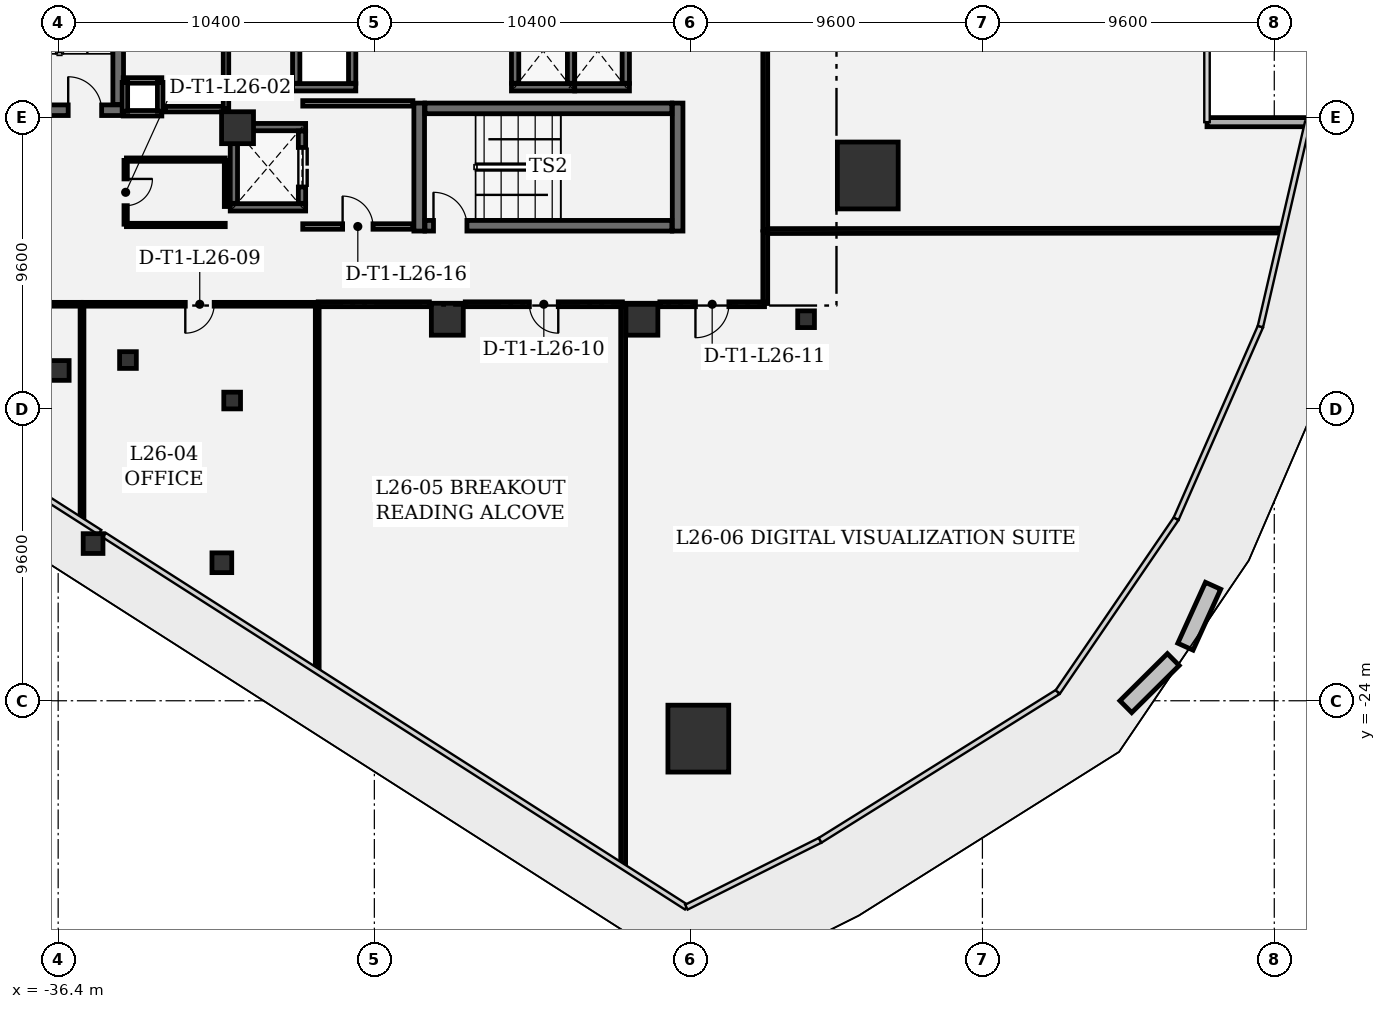
"""IFC4 building model, lengths in metres.
Left out: names, types, materials, properties, quantities, classifications, styles, units other than length and angle.
Written with IfcOpenShell. Run it as: python <this file> out.ifc"""

import sys

from ifc_helpers import new_model, si_unit, direction, frame, frame_2d, origin, origin_2d, place, context, subcontext, project, spatial, rectangle, extrude, element, fill, save


model = new_model("IFC4")
c1 = context("Model", 3, precision=1e-05, world=origin(), true_north=direction((0.0, 1.0)))
c2 = subcontext(c1, "Body", "Model", "MODEL_VIEW")
j1 = project(units=[si_unit("LENGTHUNIT", "METRE"), si_unit("PLANEANGLEUNIT", "RADIAN")], contexts=[c1])
p1 = place(None, origin())
s1 = spatial("IfcSite", under=j1, at=p1, CompositionType="ELEMENT")
p2 = place(p1, origin())
s2 = spatial("IfcBuilding", under=s1, at=p2, CompositionType="ELEMENT")
p3 = place(p2, frame((0.0, 0.0, 117.9)))
s3 = spatial("IfcBuildingStorey", under=s2, at=p3, CompositionType="ELEMENT", Elevation=117.9)
for number, where, z_axis, x_axis in (
    (1, (-15.344, -25.246, 0.0), (0.0, 0.0, 1.0), (1.0, 0.0, 0.0)),
    (2, (-9.77, -6.721, 0.0), (0.0, 0.0, 1.0), (1.0, 0.0, 0.0)),
):
    element("IfcColumn", number, at=place(p3, frame(where, z_axis=z_axis, x_axis=x_axis)), inside=s3, PredefinedType="COLUMN", context=c2, shape_type="SweptSolid", body=[
        extrude(rectangle(XDim=2.0, YDim=2.2, at=origin_2d()), origin(), (0.0, 0.0, 1.0), 4.05),
    ])
for number, where, z_axis, x_axis in (
    (3, (-17.2, -11.45, 0.0), (0.0, 0.0, 1.0), (1.0, 0.0, 0.0)),
    (4, (-23.6, -11.45, 0.0), (0.0, 0.0, 1.0), (1.0, 0.0, 0.0)),
    (5, (-30.5, -5.15, 0.0), (0.0, 0.0, 1.0), (1.0, 0.0, 0.0)),
):
    element("IfcColumn", number, at=place(p3, frame(where, z_axis=z_axis, x_axis=x_axis)), inside=s3, PredefinedType="COLUMN", context=c2, shape_type="SweptSolid", body=[
        extrude(rectangle(XDim=1.05, YDim=1.05, at=origin_2d()), origin(), (0.0, 0.0, 1.0), 4.05),
    ])
for number, where, z_axis, x_axis in (
    (6, (-35.252, -18.829, 0.0), (0.0, 0.0, 1.0), (1.0, 0.0, 0.0)),
    (7, (-31.016, -19.46, 0.0), (0.0, 0.0, 1.0), (1.0, 0.0, 0.0)),
    (8, (-36.365, -13.135, 0.0), (0.0, 0.0, 1.0), (1.0, 0.0, 0.0)),
):
    element("IfcColumn", number, at=place(p3, frame(where, z_axis=z_axis, x_axis=x_axis)), inside=s3, PredefinedType="COLUMN", context=c2, shape_type="SweptSolid", body=[
        extrude(rectangle(XDim=0.65, YDim=0.65, at=origin_2d()), origin(), (0.0, 0.0, 1.0), 4.05),
    ])
for number, where, z_axis, x_axis in (
    (9, (-34.104, -12.792, 0.0), (0.0, 0.0, 1.0), (1.0, 0.0, 0.0)),
    (10, (-30.677, -14.124, 0.0), (0.0, 0.0, 1.0), (1.0, 0.0, 0.0)),
    (11, (-11.8, -11.45, 0.0), (0.0, 0.0, 1.0), (1.0, 0.0, 0.0)),
):
    element("IfcColumn", number, at=place(p3, frame(where, z_axis=z_axis, x_axis=x_axis)), inside=s3, PredefinedType="COLUMN", context=c2, shape_type="SweptSolid", body=[
        extrude(rectangle(XDim=0.55, YDim=0.55, at=origin_2d()), origin(), (0.0, 0.0, 1.0), 4.05),
    ])
p4 = place(p3, frame((4.699, -4.968, 0.0), z_axis=(0.0, 0.0, 1.0), x_axis=(-1.0, 0.0, 0.0)))
e12 = element("IfcWall", 12, at=p4, inside=s3, PredefinedType="SOLIDWALL", context=c2, shape_type="SweptSolid", body=[
    extrude(rectangle(XDim=3.312, YDim=0.3, at=frame_2d((1.656, 0.0))), origin(), (0.0, 0.0, 1.0), 3.77),
])
for number, where, z_axis, x_axis in (
    (13, (-24.525, -4.34, 0.0), (0.0, 0.0, 1.0), (0.0, -1.0, 0.0)),
    (14, (-16.025, -8.55, 0.0), (0.0, 0.0, 1.0), (0.0, 1.0, 0.0)),
):
    element("IfcWall", number, at=place(p3, frame(where, z_axis=z_axis, x_axis=x_axis)), inside=s3, PredefinedType="SHEAR", context=c2, shape_type="SweptSolid", body=[
        extrude(rectangle(XDim=4.21, YDim=0.35, at=frame_2d((2.105, 0.0))), origin(), (0.0, 0.0, 1.0), 3.77),
    ])
p5 = place(p3, frame((-24.335, -8.375, 0.0), z_axis=(0.0, 0.0, 1.0), x_axis=(1.0, 0.0, 0.0)))
e15 = element("IfcWall", 15, at=p5, inside=s3, PredefinedType="SHEAR", context=c2, shape_type="SweptSolid", body=[
    extrude(rectangle(XDim=8.12, YDim=0.35, at=frame_2d((4.06, 0.0))), origin(), (0.0, 0.0, 1.0), 3.77),
])
p6 = place(p5, frame((0.28, 0.0, 0.0)))
e16 = element("IfcOpeningElement", 16, at=p6, cuts=e15, PredefinedType="OPENING", context=c2, shape_type="SweptSolid", body=[
    extrude(rectangle(XDim=1.1, YDim=2.2, at=frame_2d((0.55, 1.1))), frame((0.0, 0.185, 0.0), z_axis=(0.0, -1.0, 0.0), x_axis=(1.0, 0.0, 0.0)), (0.0, 0.0, 1.0), 0.37),
])
p7 = place(p3, frame((-16.215, -4.515, 0.0), z_axis=(0.0, 0.0, 1.0), x_axis=(-1.0, 0.0, 0.0)))
e17 = element("IfcWall", 17, at=p7, inside=s3, PredefinedType="SHEAR", context=c2, shape_type="SweptSolid", body=[
    extrude(rectangle(XDim=8.12, YDim=0.35, at=frame_2d((4.06, 0.0))), origin(), (0.0, 0.0, 1.0), 3.77),
])
p8 = place(p3, frame((-38.46, -4.575, 0.0), z_axis=(0.0, 0.0, 1.0), x_axis=(1.0, 0.0, 0.0)))
e18 = element("IfcWall", 18, at=p8, inside=s3, PredefinedType="SHEAR", context=c2, shape_type="SweptSolid", body=[
    extrude(rectangle(XDim=4.21, YDim=0.35, at=frame_2d((2.105, 0.0))), origin(), (0.0, 0.0, 1.0), 3.77),
])
p9 = place(p8, frame((2.39, 0.0, 0.0)))
e19 = element("IfcOpeningElement", 19, at=p9, cuts=e18, PredefinedType="OPENING", context=c2, shape_type="SweptSolid", body=[
    extrude(rectangle(XDim=1.1, YDim=2.2, at=frame_2d((0.55, 1.1))), frame((0.0, 0.185, 0.0), z_axis=(0.0, -1.0, 0.0), x_axis=(1.0, 0.0, 0.0)), (0.0, 0.0, 1.0), 0.37),
])
p10 = place(p3, frame((-34.425, -4.385, 0.0), z_axis=(0.0, 0.0, 1.0), x_axis=(0.0, 1.0, 0.0)))
e20 = element("IfcWall", 20, at=p10, inside=s3, PredefinedType="SHEAR", context=c2, shape_type="SweptSolid", body=[
    extrude(rectangle(XDim=8.77, YDim=0.35, at=frame_2d((4.385, 0.0))), origin(), (0.0, 0.0, 1.0), 3.77),
])
for number, where, z_axis, x_axis in (
    (21, (-28.26, -7.77, 0.0), (0.0, 0.0, 1.0), (-1.0, 0.0, 0.0)),
    (22, (-30.74, -5.13, 0.0), (0.0, 0.0, 1.0), (1.0, 0.0, 0.0)),
):
    element("IfcWall", number, at=place(p3, frame(where, z_axis=z_axis, x_axis=x_axis)), inside=s3, PredefinedType="SHEAR", context=c2, shape_type="SweptSolid", body=[
        extrude(rectangle(XDim=2.48, YDim=0.24, at=frame_2d((1.24, 0.0))), origin(), (0.0, 0.0, 1.0), 3.77),
    ])
p11 = place(p3, frame((-30.62, -7.638, 0.0), z_axis=(0.0, 0.0, 1.0), x_axis=(0.0, 1.0, 0.0)))
e23 = element("IfcWall", 23, at=p11, inside=s3, PredefinedType="SHEAR", context=c2, shape_type="SweptSolid", body=[
    extrude(rectangle(XDim=2.376, YDim=0.24, at=frame_2d((1.188, 0.0))), origin(), (0.0, 0.0, 1.0), 3.77),
])
p12 = place(p3, frame((-28.38, -5.262, 0.0), z_axis=(0.0, 0.0, 1.0), x_axis=(0.0, -1.0, 0.0)))
e24 = element("IfcWall", 24, at=p12, inside=s3, PredefinedType="SHEAR", context=c2, shape_type="SweptSolid", body=[
    extrude(rectangle(XDim=2.376, YDim=0.24, at=frame_2d((1.188, 0.0))), origin(), (0.0, 0.0, 1.0), 3.77),
])
p13 = place(p12, frame((0.538, 0.0, 0.0)))
e25 = element("IfcOpeningElement", 25, at=p13, cuts=e24, PredefinedType="OPENING", context=c2, shape_type="SweptSolid", body=[
    extrude(rectangle(XDim=1.3, YDim=2.3, at=frame_2d((0.65, 1.15))), frame((0.0, 0.13, 0.0), z_axis=(0.0, -1.0, 0.0), x_axis=(1.0, 0.0, 0.0)), (0.0, 0.0, 1.0), 0.26),
])
p14 = place(p3, frame((-26.61, -3.82, 0.0), z_axis=(0.0, 0.0, 1.0), x_axis=(-1.0, 0.0, 0.0)))
e26 = element("IfcWall", 26, at=p14, inside=s3, PredefinedType="SHEAR", context=c2, shape_type="SweptSolid", body=[
    extrude(rectangle(XDim=2.08, YDim=0.24, at=frame_2d((1.04, 0.0))), origin(), (0.0, 0.0, 1.0), 3.77),
])
for number, where, z_axis, x_axis in (
    (27, (-28.57, -3.688, 0.0), (0.0, 0.0, 1.0), (0.0, 1.0, 0.0)),
    (28, (-26.73, -1.562, 0.0), (0.0, 0.0, 1.0), (0.0, -1.0, 0.0)),
):
    element("IfcWall", number, at=place(p3, frame(where, z_axis=z_axis, x_axis=x_axis)), inside=s3, PredefinedType="SHEAR", context=c2, shape_type="SweptSolid", body=[
        extrude(rectangle(XDim=2.126, YDim=0.24, at=frame_2d((1.063, 0.0))), origin(), (0.0, 0.0, 1.0), 3.77),
    ])
p15 = place(p3, frame((-19.41, -3.82, 0.0), z_axis=(0.0, 0.0, 1.0), x_axis=(-1.0, 0.0, 0.0)))
e29 = element("IfcWall", 29, at=p15, inside=s3, PredefinedType="SHEAR", context=c2, shape_type="SweptSolid", body=[
    extrude(rectangle(XDim=2.08, YDim=0.24, at=frame_2d((1.04, 0.0))), origin(), (0.0, 0.0, 1.0), 3.77),
])
for number, where, z_axis, x_axis in (
    (30, (-21.37, -3.688, 0.0), (0.0, 0.0, 1.0), (0.0, 1.0, 0.0)),
    (31, (-19.53, -1.562, 0.0), (0.0, 0.0, 1.0), (0.0, -1.0, 0.0)),
):
    element("IfcWall", number, at=place(p3, frame(where, z_axis=z_axis, x_axis=x_axis)), inside=s3, PredefinedType="SHEAR", context=c2, shape_type="SweptSolid", body=[
        extrude(rectangle(XDim=2.126, YDim=0.24, at=frame_2d((1.063, 0.0))), origin(), (0.0, 0.0, 1.0), 3.77),
    ])
p16 = place(p3, frame((-17.61, -3.82, 0.0), z_axis=(0.0, 0.0, 1.0), x_axis=(-1.0, 0.0, 0.0)))
e32 = element("IfcWall", 32, at=p16, inside=s3, PredefinedType="SHEAR", context=c2, shape_type="SweptSolid", body=[
    extrude(rectangle(XDim=1.8, YDim=0.24, at=frame_2d((0.9, 0.0))), origin(), (0.0, 0.0, 1.0), 3.77),
])
p17 = place(p3, frame((-17.73, -1.562, 0.0), z_axis=(0.0, 0.0, 1.0), x_axis=(0.0, -1.0, 0.0)))
e33 = element("IfcWall", 33, at=p17, inside=s3, PredefinedType="SHEAR", context=c2, shape_type="SweptSolid", body=[
    extrude(rectangle(XDim=2.126, YDim=0.24, at=frame_2d((1.063, 0.0))), origin(), (0.0, 0.0, 1.0), 3.77),
])
for number, where, z_axis, x_axis in (
    (34, (-32.99, -4.675, 0.0), (0.0, 0.0, 1.0), (-1.0, 0.0, 0.0)),
    (35, (-34.26, -3.595, 0.0), (0.0, 0.0, 1.0), (1.0, 0.0, 0.0)),
):
    element("IfcWall", number, at=place(p3, frame(where, z_axis=z_axis, x_axis=x_axis)), inside=s3, PredefinedType="PARTITIONING", context=c2, shape_type="SweptSolid", body=[
        extrude(rectangle(XDim=1.27, YDim=0.18, at=frame_2d((0.635, 0.0))), origin(), (0.0, 0.0, 1.0), 3.77),
    ])
for number, where, z_axis, x_axis in (
    (36, (-34.205, -4.61, 0.0), (0.0, 0.0, 1.0), (0.0, 1.0, 0.0)),
    (37, (-33.045, -3.66, 0.0), (0.0, 0.0, 1.0), (0.0, -1.0, 0.0)),
):
    element("IfcWall", number, at=place(p3, frame(where, z_axis=z_axis, x_axis=x_axis)), inside=s3, PredefinedType="PARTITIONING", context=c2, shape_type="SweptSolid", body=[
        extrude(rectangle(XDim=0.95, YDim=0.18, at=frame_2d((0.475, 0.0))), origin(), (0.0, 0.0, 1.0), 3.77),
    ])
p18 = place(p3, frame((-28.355, -8.4, 0.0), z_axis=(0.0, 0.0, 1.0), x_axis=(1.0, 0.0, 0.0)))
e38 = element("IfcWall", 38, at=p18, inside=s3, PredefinedType="PARTITIONING", context=c2, shape_type="SweptSolid", body=[
    extrude(rectangle(XDim=3.622, YDim=0.18, at=frame_2d((1.811, 0.0))), origin(), (0.0, 0.0, 1.0), 3.77),
])
p19 = place(p18, frame((1.311, 0.0, 0.0)))
e39 = element("IfcOpeningElement", 39, at=p19, cuts=e38, PredefinedType="OPENING", context=c2, shape_type="SweptSolid", body=[
    extrude(rectangle(XDim=1.0, YDim=2.15, at=frame_2d((0.5, 1.075))), frame((0.0, 0.1, 0.0), z_axis=(0.0, -1.0, 0.0), x_axis=(1.0, 0.0, 0.0)), (0.0, 0.0, 1.0), 0.2),
])
p20 = place(p3, frame((-24.733, -4.35, 0.0), z_axis=(0.0, 0.0, 1.0), x_axis=(-1.0, 0.0, 0.0)))
e40 = element("IfcWall", 40, at=p20, inside=s3, PredefinedType="PARTITIONING", context=c2, shape_type="SweptSolid", body=[
    extrude(rectangle(XDim=3.622, YDim=0.18, at=frame_2d((1.811, 0.0))), origin(), (0.0, 0.0, 1.0), 3.77),
])
p21 = place(p3, frame((-34.18, -6.225, 0.0), z_axis=(0.0, 0.0, 1.0), x_axis=(0.0, -1.0, 0.0)))
e41 = element("IfcWall", 41, at=p21, inside=s3, PredefinedType="PARTITIONING", context=c2, shape_type="SweptSolid", body=[
    extrude(rectangle(XDim=2.1, YDim=0.11, at=frame_2d((1.05, 0.0))), origin(), (0.0, 0.0, 1.0), 3.77),
])
p22 = place(p21, frame((0.61, 0.0, 0.0)))
e42 = element("IfcOpeningElement", 42, at=p22, cuts=e41, PredefinedType="OPENING", context=c2, shape_type="SweptSolid", body=[
    extrude(rectangle(XDim=0.88, YDim=2.1, at=frame_2d((0.44, 1.05))), frame((0.0, 0.065, 0.0), z_axis=(0.0, -1.0, 0.0), x_axis=(1.0, 0.0, 0.0)), (0.0, 0.0, 1.0), 0.13),
])
p23 = place(p3, frame((-34.155, -8.35, 0.0), z_axis=(0.0, 0.0, 1.0), x_axis=(1.0, 0.0, 0.0)))
e43 = element("IfcWall", 43, at=p23, inside=s3, PredefinedType="PARTITIONING", context=c2, shape_type="SweptSolid", body=[
    extrude(rectangle(XDim=3.25, YDim=0.11, at=frame_2d((1.625, 0.0))), origin(), (0.0, 0.0, 1.0), 3.77),
])
p24 = place(p3, frame((-30.88, -7.743, 0.0), z_axis=(0.0, 0.0, 1.0), x_axis=(0.0, 1.0, 0.0)))
e44 = element("IfcWall", 44, at=p24, inside=s3, PredefinedType="PARTITIONING", context=c2, shape_type="SweptSolid", body=[
    extrude(rectangle(XDim=1.518, YDim=0.11, at=frame_2d((0.759, 0.0))), origin(), (0.0, 0.0, 1.0), 3.77),
])
p25 = place(p3, frame((-30.905, -6.2, 0.0), z_axis=(0.0, 0.0, 1.0), x_axis=(-1.0, 0.0, 0.0)))
e45 = element("IfcWall", 45, at=p25, inside=s3, PredefinedType="PARTITIONING", context=c2, shape_type="SweptSolid", body=[
    extrude(rectangle(XDim=3.25, YDim=0.11, at=frame_2d((1.625, 0.0))), origin(), (0.0, 0.0, 1.0), 3.334),
])
p26 = place(p3, frame((-32.88, -4.54, 0.0), z_axis=(0.0, 0.0, 1.0), x_axis=(1.0, 0.0, 0.0)))
e46 = element("IfcWall", 46, at=p26, inside=s3, PredefinedType="PARTITIONING", context=c2, shape_type="SweptSolid", body=[
    extrude(rectangle(XDim=1.975, YDim=0.18, at=frame_2d((0.988, 0.0))), origin(), (0.0, 0.0, 1.0), 3.77),
])
p27 = place(p3, frame((-30.88, -4.515, 0.0), z_axis=(0.0, 0.0, 1.0), x_axis=(0.0, 1.0, 0.0)))
e47 = element("IfcWall", 47, at=p27, inside=s3, PredefinedType="PARTITIONING", context=c2, shape_type="SweptSolid", body=[
    extrude(rectangle(XDim=2.89, YDim=0.18, at=frame_2d((1.445, 0.0))), origin(), (0.0, 0.0, 1.0), 3.77),
])
p28 = place(p3, frame((-35.64, -10.958, 0.0), z_axis=(0.0, 0.0, 1.0), x_axis=(-1.0, 0.0, 0.0)))
e48 = element("IfcWall", 48, at=p28, inside=s3, PredefinedType="PARTITIONING", context=c2, shape_type="SweptSolid", body=[
    extrude(rectangle(XDim=2.193, YDim=0.125, at=frame_2d((1.096, 0.0))), origin(), (0.0, 0.0, 1.0), 3.334),
])
p29 = place(p3, frame((-35.615, -18.004, 0.0), z_axis=(0.0, 0.0, 1.0), x_axis=(0.0, 1.0, 0.0)))
e49 = element("IfcWall", 49, at=p29, inside=s3, PredefinedType="PARTITIONING", context=c2, shape_type="SweptSolid", body=[
    extrude(rectangle(XDim=7.021, YDim=0.125, at=frame_2d((3.511, 0.0))), origin(), (0.0, 0.0, 1.0), 3.77),
])
p30 = place(p3, frame((-27.904, -10.958, 0.0), z_axis=(0.0, 0.0, 1.0), x_axis=(-1.0, 0.0, 0.0)))
e50 = element("IfcWall", 50, at=p30, inside=s3, PredefinedType="PARTITIONING", context=c2, shape_type="SweptSolid", body=[
    extrude(rectangle(XDim=7.679, YDim=0.125, at=frame_2d((3.839, 0.0))), origin(), (0.0, 0.0, 1.0), 3.334),
])
p31 = place(p30, frame((3.365, 0.0, 0.0)))
e51 = element("IfcOpeningElement", 51, at=p31, cuts=e50, PredefinedType="OPENING", context=c2, shape_type="SweptSolid", body=[
    extrude(rectangle(XDim=0.95, YDim=2.15, at=frame_2d((0.475, 1.075))), frame((0.0, 0.073, 0.0), z_axis=(0.0, -1.0, 0.0), x_axis=(1.0, 0.0, 0.0)), (0.0, 0.0, 1.0), 0.145),
])
p32 = place(p3, frame((-27.879, -22.949, 0.0), z_axis=(0.0, 0.0, 1.0), x_axis=(0.0, 1.0, 0.0)))
e52 = element("IfcWall", 52, at=p32, inside=s3, PredefinedType="PARTITIONING", context=c2, shape_type="SweptSolid", body=[
    extrude(rectangle(XDim=11.966, YDim=0.125, at=frame_2d((5.983, 0.0))), origin(), (0.0, 0.0, 1.0), 3.334),
])
p33 = place(p3, frame((-24.19, -10.958, 0.0), z_axis=(0.0, 0.0, 1.0), x_axis=(-1.0, 0.0, 0.0)))
e53 = element("IfcWall", 53, at=p33, inside=s3, PredefinedType="PARTITIONING", context=c2, shape_type="SweptSolid", body=[
    extrude(rectangle(XDim=3.656, YDim=0.16, at=frame_2d((1.828, 0.0))), origin(), (0.0, 0.0, 1.0), 3.77),
])
p34 = place(p3, frame((-17.816, -29.38, 0.0), z_axis=(0.0, 0.0, 1.0), x_axis=(0.0, 1.0, 0.0)))
e54 = element("IfcWall", 54, at=p34, inside=s3, PredefinedType="PARTITIONING", context=c2, shape_type="SweptSolid", body=[
    extrude(rectangle(XDim=18.397, YDim=0.16, at=frame_2d((9.199, 0.0))), origin(), (0.0, 0.0, 1.0), 2.885),
])
p35 = place(p3, frame((-17.841, -10.958, 0.0), z_axis=(0.0, 0.0, 1.0), x_axis=(-1.0, 0.0, 0.0)))
e55 = element("IfcWall", 55, at=p35, inside=s3, PredefinedType="PARTITIONING", context=c2, shape_type="SweptSolid", body=[
    extrude(rectangle(XDim=5.169, YDim=0.16, at=frame_2d((2.584, 0.0))), origin(), (0.0, 0.0, 1.0), 3.77),
])
p36 = place(p35, frame((2.109, 0.0, 0.0)))
e56 = element("IfcOpeningElement", 56, at=p36, cuts=e55, PredefinedType="OPENING", context=c2, shape_type="SweptSolid", body=[
    extrude(rectangle(XDim=0.95, YDim=2.15, at=frame_2d((0.475, 1.075))), frame((0.0, 0.09, 0.0), z_axis=(0.0, -1.0, 0.0), x_axis=(1.0, 0.0, 0.0)), (0.0, 0.0, 1.0), 0.18),
])
p37 = place(p3, frame((3.794, -8.534, 0.0), z_axis=(0.0, 0.0, 1.0), x_axis=(-0.999999573173, -0.000923933833, 0.0)))
e57 = element("IfcWall", 57, at=p37, inside=s3, PredefinedType="PARTITIONING", context=c2, shape_type="SweptSolid", body=[
    extrude(rectangle(XDim=16.911, YDim=0.16, at=frame_2d((8.456, 0.0))), origin(), (0.0, 0.0, 1.0), 2.885),
])
p38 = place(p3, frame((-13.142, -8.575, 0.0), z_axis=(0.0, 0.0, 1.0), x_axis=(0.0, -1.0, 0.0)))
e58 = element("IfcWall", 58, at=p38, inside=s3, PredefinedType="PARTITIONING", context=c2, shape_type="SweptSolid", body=[
    extrude(rectangle(XDim=2.358, YDim=0.16, at=frame_2d((1.179, 0.0))), origin(), (0.0, 0.0, 1.0), 3.77),
])
p39 = place(p3, frame((-13.167, -10.958, 0.0), z_axis=(0.0, 0.0, 1.0), x_axis=(-1.0, 0.0, 0.0)))
e59 = element("IfcWall", 59, at=p39, inside=s3, PredefinedType="PARTITIONING", context=c2, shape_type="SweptSolid", body=[
    extrude(rectangle(XDim=3.443, YDim=0.16, at=frame_2d((1.722, 0.0))), origin(), (0.0, 0.0, 1.0), 2.885),
])
p40 = place(p39, frame((1.172, 0.0, 0.0)))
e60 = element("IfcOpeningElement", 60, at=p40, cuts=e59, PredefinedType="OPENING", context=c2, shape_type="SweptSolid", body=[
    extrude(rectangle(XDim=1.1, YDim=2.15, at=frame_2d((0.55, 1.075))), frame((0.0, 0.09, 0.0), z_axis=(0.0, -1.0, 0.0), x_axis=(1.0, 0.0, 0.0)), (0.0, 0.0, 1.0), 0.18),
])
p41 = place(p3, frame((-13.142, 8.287, 0.0), z_axis=(0.0, 0.0, 1.0), x_axis=(0.0, -1.0, 0.0)))
e61 = element("IfcWall", 61, at=p41, inside=s3, PredefinedType="PARTITIONING", context=c2, shape_type="SweptSolid", body=[
    extrude(rectangle(XDim=16.804, YDim=0.16, at=frame_2d((8.402, 0.0))), origin(), (0.0, 0.0, 1.0), 3.77),
])
p42 = place(p6, origin())
e62 = element("IfcDoor", 62, at=p42, inside=s3, OperationType="SINGLE_SWING_LEFT", PredefinedType="DOOR", context=c2, shape_type="SweptSolid", body=[
    extrude(rectangle(XDim=1.1, YDim=2.2, at=frame_2d((0.55, 1.1))), frame((0.0, 0.025, 0.0), z_axis=(0.0, -1.0, 0.0), x_axis=(1.0, 0.0, 0.0)), (0.0, 0.0, 1.0), 0.05),
])
fill(e16, e62)
p43 = place(p9, origin())
e63 = element("IfcDoor", 63, at=p43, inside=s3, OperationType="SINGLE_SWING_LEFT", PredefinedType="DOOR", context=c2, shape_type="SweptSolid", body=[
    extrude(rectangle(XDim=1.1, YDim=2.2, at=frame_2d((0.55, 1.1))), frame((0.0, 0.025, 0.0), z_axis=(0.0, -1.0, 0.0), x_axis=(1.0, 0.0, 0.0)), (0.0, 0.0, 1.0), 0.05),
])
fill(e19, e63)
p44 = place(p13, origin())
e64 = element("IfcDoor", 64, at=p44, inside=s3, OperationType="DOUBLE_DOOR_SLIDING", PredefinedType="DOOR", context=c2, shape_type="SweptSolid", body=[
    extrude(rectangle(XDim=1.3, YDim=2.3, at=frame_2d((0.65, 1.15))), frame((0.0, 0.025, 0.0), z_axis=(0.0, -1.0, 0.0), x_axis=(1.0, 0.0, 0.0)), (0.0, 0.0, 1.0), 0.05),
])
fill(e25, e64)
p45 = place(p22, origin())
e65 = element("IfcDoor", 65, at=p45, inside=s3, OperationType="SINGLE_SWING_LEFT", PredefinedType="DOOR", context=c2, shape_type="SweptSolid", body=[
    extrude(rectangle(XDim=0.88, YDim=2.1, at=frame_2d((0.44, 1.05))), frame((0.0, 0.025, 0.0), z_axis=(0.0, -1.0, 0.0), x_axis=(1.0, 0.0, 0.0)), (0.0, 0.0, 1.0), 0.05),
])
fill(e42, e65)
p46 = place(p31, origin())
e66 = element("IfcDoor", 66, at=p46, inside=s3, OperationType="SINGLE_SWING_RIGHT", PredefinedType="DOOR", context=c2, shape_type="SweptSolid", body=[
    extrude(rectangle(XDim=0.95, YDim=2.15, at=frame_2d((0.475, 1.075))), frame((0.0, 0.025, 0.0), z_axis=(0.0, -1.0, 0.0), x_axis=(1.0, 0.0, 0.0)), (0.0, 0.0, 1.0), 0.05),
])
fill(e51, e66)
p47 = place(p36, origin())
e67 = element("IfcDoor", 67, at=p47, inside=s3, OperationType="SINGLE_SWING_LEFT", PredefinedType="DOOR", context=c2, shape_type="SweptSolid", body=[
    extrude(rectangle(XDim=0.95, YDim=2.15, at=frame_2d((0.475, 1.075))), frame((0.0, 0.025, 0.0), z_axis=(0.0, -1.0, 0.0), x_axis=(1.0, 0.0, 0.0)), (0.0, 0.0, 1.0), 0.05),
])
fill(e56, e67)
p48 = place(p40, origin())
e68 = element("IfcDoor", 68, at=p48, inside=s3, OperationType="SINGLE_SWING_RIGHT", PredefinedType="DOOR", context=c2, shape_type="SweptSolid", body=[
    extrude(rectangle(XDim=1.1, YDim=2.15, at=frame_2d((0.55, 1.075))), frame((0.0, 0.025, 0.0), z_axis=(0.0, -1.0, 0.0), x_axis=(1.0, 0.0, 0.0)), (0.0, 0.0, 1.0), 0.05),
])
fill(e60, e68)
p49 = place(p19, origin())
e69 = element("IfcDoor", 69, at=p49, inside=s3, OperationType="SINGLE_SWING_LEFT", PredefinedType="DOOR", context=c2, shape_type="SweptSolid", body=[
    extrude(rectangle(XDim=1.0, YDim=2.15, at=frame_2d((0.5, 1.075))), frame((0.0, 0.025, 0.0), z_axis=(0.0, -1.0, 0.0), x_axis=(1.0, 0.0, 0.0)), (0.0, 0.0, 1.0), 0.05),
])
fill(e39, e69)
save(model, sys.argv[1])
